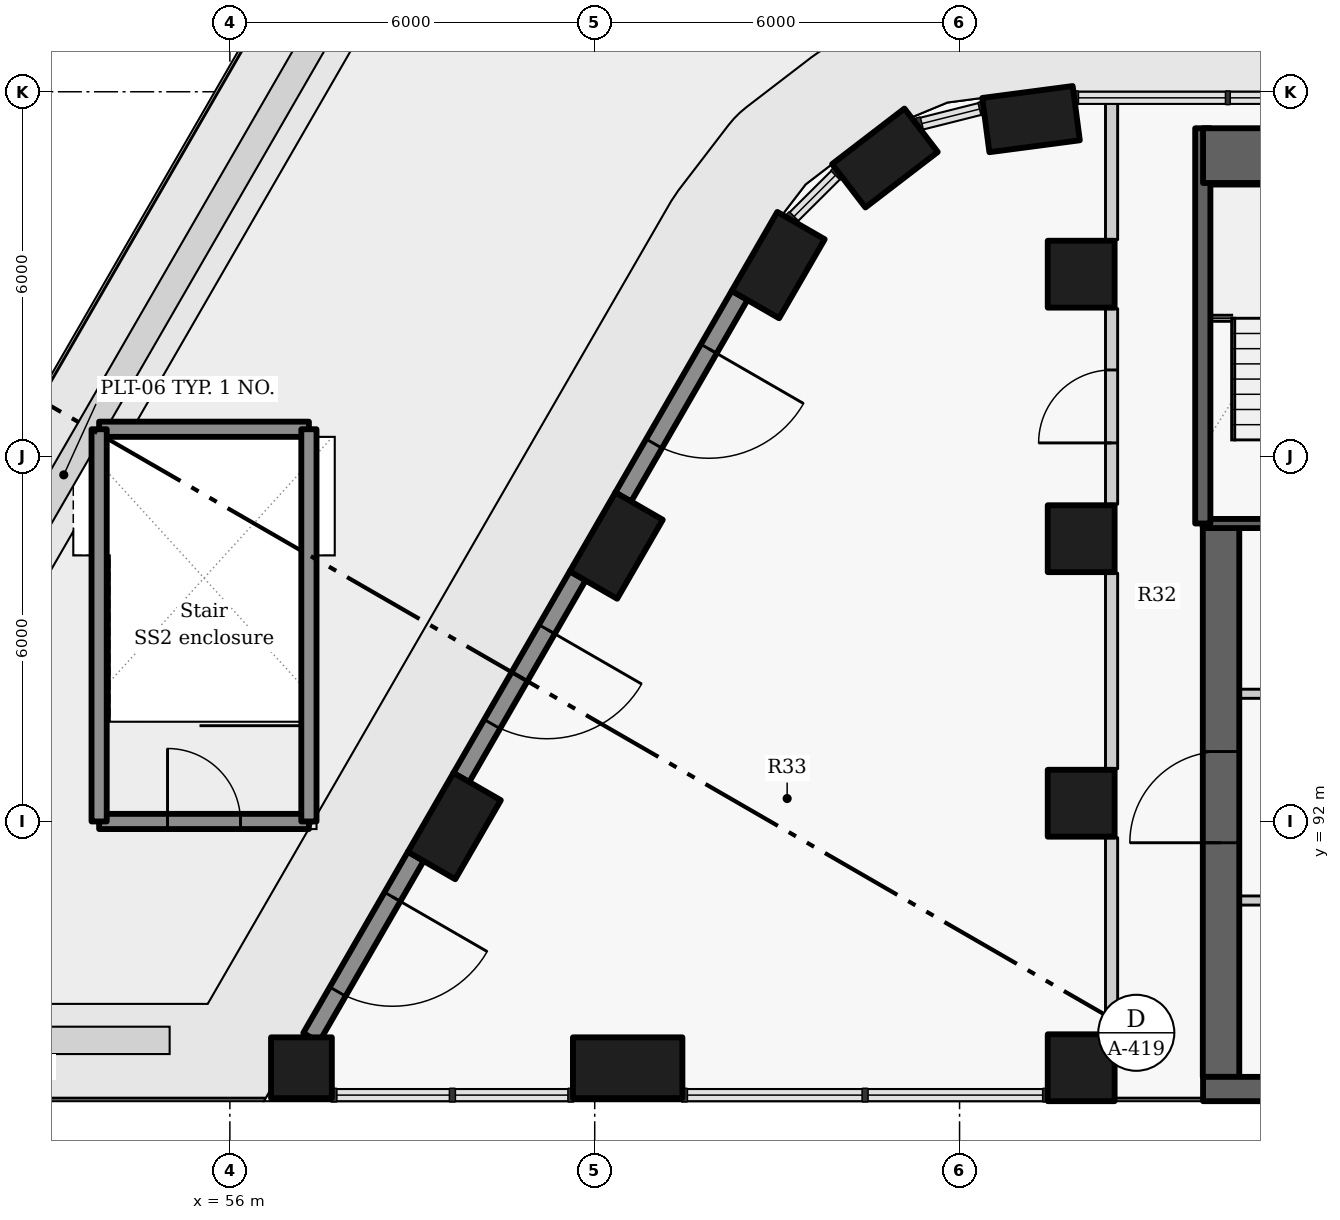
"""IFC4 building model, lengths in metres.
Left out: names, types, materials, properties, quantities, classifications, styles, units other than length and angle.
Written with IfcOpenShell. Run it as: python <this file> out.ifc"""

import sys

from ifc_helpers import new_model, si_unit, direction, frame, frame_2d, origin, origin_2d, place, context, subcontext, project, spatial, rectangle, extrude, element, fill, save


model = new_model("IFC4")
c1 = context("Model", 3, precision=1e-05, world=origin(), true_north=direction((0.0, 1.0)))
c2 = subcontext(c1, "Body", "Model", "MODEL_VIEW")
j1 = project(units=[si_unit("LENGTHUNIT", "METRE"), si_unit("PLANEANGLEUNIT", "RADIAN")], contexts=[c1])
p1 = place(None, origin())
s1 = spatial("IfcSite", under=j1, at=p1, CompositionType="ELEMENT")
p2 = place(p1, origin())
s2 = spatial("IfcBuilding", under=s1, at=p2, CompositionType="ELEMENT")
p3 = place(p2, frame((0.0, 0.0, 28.2)))
s3 = spatial("IfcBuildingStorey", under=s2, at=p3, CompositionType="ELEMENT", Elevation=28.2)
for number, where, z_axis, x_axis in (
    (1, (69.175, 103.55, 0.0), (0.0, 0.0, 1.0), (-0.991, -0.131, 0.0)),
    (2, (66.773, 102.91, 0.0), (0.0, 0.0, 1.0), (-0.793, -0.609, 0.0)),
    (3, (65.018, 101.149, 0.0), (0.0, 0.0, 1.0), (-0.5, -0.866, 0.0)),
    (4, (62.354, 96.537, 0.0), (0.0, 0.0, 1.0), (-0.5, -0.866, 0.0)),
    (5, (59.692, 91.925, 0.0), (0.0, 0.0, 1.0), (-0.5, -0.866, 0.0)),
):
    element("IfcColumn", number, at=place(p3, frame(where, z_axis=z_axis, x_axis=x_axis)), inside=s3, PredefinedType="COLUMN", context=c2, shape_type="SweptSolid", body=[
        extrude(rectangle(XDim=1.5, YDim=0.9, at=origin_2d()), origin(), (0.0, 0.0, 1.0), 3.3),
    ])
for number, where, z_axis, x_axis in (
    (6, (70.0, 101.0, 0.0), (0.0, 0.0, 1.0), (0.0, -1.0, 0.0)),
    (7, (70.0, 96.65, 0.0), (0.0, 0.0, 1.0), (0.0, -1.0, 0.0)),
    (8, (70.0, 92.3, 0.0), (0.0, 0.0, 1.0), (0.0, -1.0, 0.0)),
    (9, (70.0, 87.95, 0.0), (0.0, 0.0, 1.0), (0.0, -1.0, 0.0)),
):
    element("IfcColumn", number, at=place(p3, frame(where, z_axis=z_axis, x_axis=x_axis)), inside=s3, PredefinedType="COLUMN", context=c2, shape_type="SweptSolid", body=[
        extrude(rectangle(XDim=1.1, YDim=1.1, at=origin_2d()), origin(), (0.0, 0.0, 1.0), 3.3),
    ])
p4 = place(p3, frame((62.542, 87.95, 0.0), z_axis=(0.0, 0.0, 1.0), x_axis=(1.0, 0.0, 0.0)))
e10 = element("IfcColumn", 10, at=p4, inside=s3, PredefinedType="COLUMN", context=c2, shape_type="SweptSolid", body=[
    extrude(rectangle(XDim=1.8, YDim=1.0, at=origin_2d()), origin(), (0.0, 0.0, 1.0), 3.3),
])
p5 = place(p3, frame((57.177, 87.95, 0.0), z_axis=(0.0, 0.0, 1.0), x_axis=(1.0, 0.0, 0.0)))
e11 = element("IfcColumn", 11, at=p5, inside=s3, PredefinedType="COLUMN", context=c2, shape_type="SweptSolid", body=[
    extrude(rectangle(XDim=1.0, YDim=1.0, at=origin_2d()), origin(), (0.0, 0.0, 1.0), 3.3),
])
p6 = place(p3, frame((61.722, 96.041, 0.0), z_axis=(0.0, 0.0, 1.0), x_axis=(-0.500001735503, -0.866024401789, 0.0)))
e12 = element("IfcWall", 12, at=p6, inside=s3, PredefinedType="SOLIDWALL", context=c2, shape_type="SweptSolid", body=[
    extrude(rectangle(XDim=3.834, YDim=0.3, at=frame_2d((1.917, 0.0))), origin(), (0.0, 0.0, 1.0), 2.425),
])
p7 = place(p6, frame((1.017, 0.0, 0.0)))
e13 = element("IfcOpeningElement", 13, at=p7, cuts=e12, PredefinedType="OPENING", context=c2, shape_type="SweptSolid", body=[
    extrude(rectangle(XDim=1.8, YDim=2.0, at=frame_2d((0.9, 1.0))), frame((0.0, 0.16, 0.0), z_axis=(0.0, -1.0, 0.0), x_axis=(1.0, 0.0, 0.0)), (0.0, 0.0, 1.0), 0.32),
])
p8 = place(p3, frame((59.059, 91.429, 0.0), z_axis=(0.0, 0.0, 1.0), x_axis=(-0.500035437112, -0.866004943191, 0.0)))
e14 = element("IfcWall", 14, at=p8, inside=s3, PredefinedType="SOLIDWALL", context=c2, shape_type="SweptSolid", body=[
    extrude(rectangle(XDim=3.444, YDim=0.3, at=frame_2d((1.722, 0.0))), origin(), (0.0, 0.0, 1.0), 2.425),
])
p9 = place(p8, frame((0.771, 0.0, 0.0)))
e15 = element("IfcOpeningElement", 15, at=p9, cuts=e14, PredefinedType="OPENING", context=c2, shape_type="SweptSolid", body=[
    extrude(rectangle(XDim=1.8, YDim=2.0, at=frame_2d((0.9, 1.0))), frame((0.0, 0.16, 0.0), z_axis=(0.0, -1.0, 0.0), x_axis=(1.0, 0.0, 0.0)), (0.0, 0.0, 1.0), 0.32),
])
p10 = place(p3, frame((64.385, 100.654, 0.0), z_axis=(0.0, 0.0, 1.0), x_axis=(-0.499974163209, -0.866040320149, 0.0)))
e16 = element("IfcWall", 16, at=p10, inside=s3, PredefinedType="SOLIDWALL", context=c2, shape_type="SweptSolid", body=[
    extrude(rectangle(XDim=3.834, YDim=0.3, at=frame_2d((1.917, 0.0))), origin(), (0.0, 0.0, 1.0), 2.425),
])
p11 = place(p10, frame((1.017, 0.0, 0.0)))
e17 = element("IfcOpeningElement", 17, at=p11, cuts=e16, PredefinedType="OPENING", context=c2, shape_type="SweptSolid", body=[
    extrude(rectangle(XDim=1.8, YDim=2.0, at=frame_2d((0.9, 1.0))), frame((0.0, 0.16, 0.0), z_axis=(0.0, -1.0, 0.0), x_axis=(1.0, 0.0, 0.0)), (0.0, 0.0, 1.0), 0.32),
])
p12 = place(p3, frame((74.6, 90.7, 0.0), z_axis=(0.0, 0.0, 1.0), x_axis=(-1.0, 0.0, 0.0)))
e18 = element("IfcWall", 18, at=p12, inside=s3, PredefinedType="PARTITIONING", context=c2, shape_type="SweptSolid", body=[
    extrude(rectangle(XDim=2.6, YDim=0.15, at=frame_2d((1.3, 0.0))), origin(), (0.0, 0.0, 1.0), 3.025),
])
p13 = place(p12, frame((0.525, 0.0, 0.0)))
e19 = element("IfcOpeningElement", 19, at=p13, cuts=e18, PredefinedType="OPENING", context=c2, shape_type="SweptSolid", body=[
    extrude(rectangle(XDim=0.9, YDim=2.1, at=frame_2d((0.45, 1.05))), frame((0.0, 0.085, 0.0), z_axis=(0.0, -1.0, 0.0), x_axis=(1.0, 0.0, 0.0)), (0.0, 0.0, 1.0), 0.17),
])
p14 = place(p3, frame((72.3, 87.8, -0.275), z_axis=(0.0, 0.0, 1.0), x_axis=(0.0, 1.0, 0.0)))
e20 = element("IfcWall", 20, at=p14, inside=s3, PredefinedType="SHEAR", context=c2, shape_type="SweptSolid", body=[
    extrude(rectangle(XDim=9.1, YDim=0.6, at=frame_2d((4.55, 0.0))), origin(), (0.0, 0.0, 1.0), 3.3),
])
p15 = place(p14, frame((3.85, 0.0, 0.275)))
e21 = element("IfcOpeningElement", 21, at=p15, cuts=e20, PredefinedType="OPENING", context=c2, shape_type="SweptSolid", body=[
    extrude(rectangle(XDim=1.5, YDim=2.1, at=frame_2d((0.75, 1.05))), frame((0.0, 0.31, 0.0), z_axis=(0.0, -1.0, 0.0), x_axis=(1.0, 0.0, 0.0)), (0.0, 0.0, 1.0), 0.62),
])
p16 = place(p3, frame((72.0, 94.1, 0.0), z_axis=(0.0, 0.0, 1.0), x_axis=(1.0, 0.0, 0.0)))
e22 = element("IfcWall", 22, at=p16, inside=s3, PredefinedType="PARTITIONING", context=c2, shape_type="SweptSolid", body=[
    extrude(rectangle(XDim=2.603, YDim=0.15, at=frame_2d((1.302, 0.0))), origin(), (0.0, 0.0, 1.0), 3.025),
])
p17 = place(p16, frame((1.075, 0.0, 0.0)))
e23 = element("IfcOpeningElement", 23, at=p17, cuts=e22, PredefinedType="OPENING", context=c2, shape_type="SweptSolid", body=[
    extrude(rectangle(XDim=1.1, YDim=2.1, at=frame_2d((0.55, 1.05))), frame((0.0, 0.085, 0.0), z_axis=(0.0, -1.0, 0.0), x_axis=(1.0, 0.0, 0.0)), (0.0, 0.0, 1.0), 0.17),
])
p18 = place(p3, frame((74.6, 96.9, -0.275), z_axis=(0.0, 0.0, 1.0), x_axis=(-1.0, 0.0, 0.0)))
e24 = element("IfcWall", 24, at=p18, inside=s3, PredefinedType="SHEAR", context=c2, shape_type="SweptSolid", body=[
    extrude(rectangle(XDim=2.6, YDim=0.15, at=frame_2d((1.3, 0.0))), origin(), (0.0, 0.0, 1.0), 3.3),
])
p19 = place(p18, frame((0.37, 0.0, 0.275)))
e25 = element("IfcOpeningElement", 25, at=p19, cuts=e24, PredefinedType="OPENING", context=c2, shape_type="SweptSolid", body=[
    extrude(rectangle(XDim=1.1, YDim=2.1, at=frame_2d((0.55, 1.05))), frame((0.0, 0.085, 0.0), z_axis=(0.0, -1.0, 0.0), x_axis=(1.0, 0.0, 0.0)), (0.0, 0.0, 1.0), 0.17),
])
p20 = place(p3, frame((72.0, 96.9, -0.275), z_axis=(0.0, 0.0, 1.0), x_axis=(0.0, 1.0, 0.0)))
e26 = element("IfcWall", 26, at=p20, inside=s3, PredefinedType="SHEAR", context=c2, shape_type="SweptSolid", body=[
    extrude(rectangle(XDim=6.5, YDim=0.25, at=frame_2d((3.25, 0.0))), origin(), (0.0, 0.0, 1.0), 3.3),
])
p21 = place(p3, frame((70.5, 88.517, 0.0), z_axis=(0.0, 0.0, 1.0), x_axis=(0.0, 1.0, 0.0)))
e27 = element("IfcWall", 27, at=p21, inside=s3, PredefinedType="PARTITIONING", context=c2, shape_type="SweptSolid", body=[
    extrude(rectangle(XDim=3.216, YDim=0.2, at=frame_2d((1.608, 0.0))), origin(), (0.0, 0.0, 1.0), 3.025),
])
p22 = place(p3, frame((70.5, 92.867, 0.0), z_axis=(0.0, 0.0, 1.0), x_axis=(0.0, 1.0, 0.0)))
e28 = element("IfcWall", 28, at=p22, inside=s3, PredefinedType="PARTITIONING", context=c2, shape_type="SweptSolid", body=[
    extrude(rectangle(XDim=3.216, YDim=0.2, at=frame_2d((1.608, 0.0))), origin(), (0.0, 0.0, 1.0), 3.025),
])
p23 = place(p3, frame((70.5, 97.217, 0.0), z_axis=(0.0, 0.0, 1.0), x_axis=(0.0, 1.0, 0.0)))
e29 = element("IfcWall", 29, at=p23, inside=s3, PredefinedType="PARTITIONING", context=c2, shape_type="SweptSolid", body=[
    extrude(rectangle(XDim=3.216, YDim=0.2, at=frame_2d((1.608, 0.0))), origin(), (0.0, 0.0, 1.0), 3.025),
])
p24 = place(p23, frame((1.008, 0.0, 0.0)))
e30 = element("IfcOpeningElement", 30, at=p24, cuts=e29, PredefinedType="OPENING", context=c2, shape_type="SweptSolid", body=[
    extrude(rectangle(XDim=1.2, YDim=2.1, at=frame_2d((0.6, 1.05))), frame((0.0, 0.11, 0.0), z_axis=(0.0, -1.0, 0.0), x_axis=(1.0, 0.0, 0.0)), (0.0, 0.0, 1.0), 0.22),
])
p25 = place(p3, frame((70.5, 101.567, 0.0), z_axis=(0.0, 0.0, 1.0), x_axis=(0.0, 1.0, 0.0)))
e31 = element("IfcWall", 31, at=p25, inside=s3, PredefinedType="PARTITIONING", context=c2, shape_type="SweptSolid", body=[
    extrude(rectangle(XDim=2.253, YDim=0.2, at=frame_2d((1.126, 0.0))), origin(), (0.0, 0.0, 1.0), 3.025),
])
p26 = place(p3, frame((72.004, 87.6, -0.275), z_axis=(0.0, 0.0, 1.0), x_axis=(1.0, 0.0, 0.0)))
e32 = element("IfcWall", 32, at=p26, inside=s3, PredefinedType="SHEAR", context=c2, shape_type="SweptSolid", body=[
    extrude(rectangle(XDim=15.992, YDim=0.4, at=frame_2d((7.996, 0.0))), origin(), (0.0, 0.0, 1.0), 3.3),
])
p27 = place(p3, frame((72.004, 102.95, -0.275), z_axis=(0.0, 0.0, 1.0), x_axis=(1.0, 0.0, 0.0)))
e33 = element("IfcWall", 33, at=p27, inside=s3, PredefinedType="SHEAR", context=c2, shape_type="SweptSolid", body=[
    extrude(rectangle(XDim=15.992, YDim=0.9, at=frame_2d((7.996, 0.0))), origin(), (0.0, 0.0, 1.0), 3.3),
])
p28 = place(p3, frame((53.85, 92.0, 0.0), z_axis=(0.0, 0.0, 1.0), x_axis=(1.0, 0.0, 0.0)))
e34 = element("IfcWall", 34, at=p28, inside=s3, PredefinedType="SHEAR", context=c2, shape_type="SweptSolid", body=[
    extrude(rectangle(XDim=3.45, YDim=0.25, at=frame_2d((1.725, 0.0))), origin(), (0.0, 0.0, 1.0), 2.5),
])
p29 = place(p28, frame((1.125, 0.0, 0.0)))
e35 = element("IfcOpeningElement", 35, at=p29, cuts=e34, PredefinedType="OPENING", context=c2, shape_type="SweptSolid", body=[
    extrude(rectangle(XDim=1.2, YDim=2.1, at=frame_2d((0.6, 1.05))), frame((0.0, 0.135, 0.0), z_axis=(0.0, -1.0, 0.0), x_axis=(1.0, 0.0, 0.0)), (0.0, 0.0, 1.0), 0.27),
])
p30 = place(p3, frame((57.3, 98.45, 0.0), z_axis=(0.0, 0.0, 1.0), x_axis=(-1.0, 0.0, 0.0)))
e36 = element("IfcWall", 36, at=p30, inside=s3, PredefinedType="SHEAR", context=c2, shape_type="SweptSolid", body=[
    extrude(rectangle(XDim=3.45, YDim=0.25, at=frame_2d((1.725, 0.0))), origin(), (0.0, 0.0, 1.0), 2.5),
])
for number, where, z_axis, x_axis in (
    (37, (57.3, 92.0, 0.0), (0.0, 0.0, 1.0), (0.0, 1.0, 0.0)),
    (38, (53.85, 98.45, 0.0), (0.0, 0.0, 1.0), (0.0, -1.0, 0.0)),
):
    element("IfcWall", number, at=place(p3, frame(where, z_axis=z_axis, x_axis=x_axis)), inside=s3, PredefinedType="SHEAR", context=c2, shape_type="SweptSolid", body=[
        extrude(rectangle(XDim=6.45, YDim=0.25, at=frame_2d((3.225, 0.0))), origin(), (0.0, 0.0, 1.0), 2.5),
    ])
p31 = place(p7, frame((1.8, 0.0, 0.0), z_axis=(0.0, 0.0, 1.0), x_axis=(-1.0, 0.0, 0.0)))
e39 = element("IfcDoor", 39, at=p31, inside=s3, OperationType="DOUBLE_DOOR_SINGLE_SWING", PredefinedType="DOOR", context=c2, shape_type="SweptSolid", body=[
    extrude(rectangle(XDim=1.8, YDim=2.0, at=frame_2d((0.9, 1.0))), frame((0.0, 0.025, 0.0), z_axis=(0.0, -1.0, 0.0), x_axis=(1.0, 0.0, 0.0)), (0.0, 0.0, 1.0), 0.05),
])
fill(e13, e39)
p32 = place(p9, frame((1.8, 0.0, 0.0), z_axis=(0.0, 0.0, 1.0), x_axis=(-1.0, 0.0, 0.0)))
e40 = element("IfcDoor", 40, at=p32, inside=s3, OperationType="DOUBLE_DOOR_SINGLE_SWING", PredefinedType="DOOR", context=c2, shape_type="SweptSolid", body=[
    extrude(rectangle(XDim=1.8, YDim=2.0, at=frame_2d((0.9, 1.0))), frame((0.0, 0.025, 0.0), z_axis=(0.0, -1.0, 0.0), x_axis=(1.0, 0.0, 0.0)), (0.0, 0.0, 1.0), 0.05),
])
fill(e15, e40)
p33 = place(p11, frame((1.8, 0.0, 0.0), z_axis=(0.0, 0.0, 1.0), x_axis=(-1.0, 0.0, 0.0)))
e41 = element("IfcDoor", 41, at=p33, inside=s3, OperationType="DOUBLE_DOOR_SINGLE_SWING", PredefinedType="DOOR", context=c2, shape_type="SweptSolid", body=[
    extrude(rectangle(XDim=1.8, YDim=2.0, at=frame_2d((0.9, 1.0))), frame((0.0, 0.025, 0.0), z_axis=(0.0, -1.0, 0.0), x_axis=(1.0, 0.0, 0.0)), (0.0, 0.0, 1.0), 0.05),
])
fill(e17, e41)
p34 = place(p24, origin())
e42 = element("IfcDoor", 42, at=p34, inside=s3, OperationType="SINGLE_SWING_LEFT", PredefinedType="DOOR", context=c2, shape_type="SweptSolid", body=[
    extrude(rectangle(XDim=1.2, YDim=2.1, at=frame_2d((0.6, 1.05))), frame((0.0, 0.025, 0.0), z_axis=(0.0, -1.0, 0.0), x_axis=(1.0, 0.0, 0.0)), (0.0, 0.0, 1.0), 0.05),
])
fill(e30, e42)
p35 = place(p15, origin())
e43 = element("IfcDoor", 43, at=p35, inside=s3, OperationType="DOUBLE_DOOR_SINGLE_SWING", PredefinedType="DOOR", context=c2, shape_type="SweptSolid", body=[
    extrude(rectangle(XDim=1.5, YDim=2.1, at=frame_2d((0.75, 1.05))), frame((0.0, 0.025, 0.0), z_axis=(0.0, -1.0, 0.0), x_axis=(1.0, 0.0, 0.0)), (0.0, 0.0, 1.0), 0.05),
])
fill(e21, e43)
p36 = place(p29, origin())
e44 = element("IfcDoor", 44, at=p36, inside=s3, OperationType="DOUBLE_DOOR_SINGLE_SWING", PredefinedType="DOOR", context=c2, shape_type="SweptSolid", body=[
    extrude(rectangle(XDim=1.2, YDim=2.1, at=frame_2d((0.6, 1.05))), frame((0.0, 0.025, 0.0), z_axis=(0.0, -1.0, 0.0), x_axis=(1.0, 0.0, 0.0)), (0.0, 0.0, 1.0), 0.05),
])
fill(e35, e44)
save(model, sys.argv[1])
